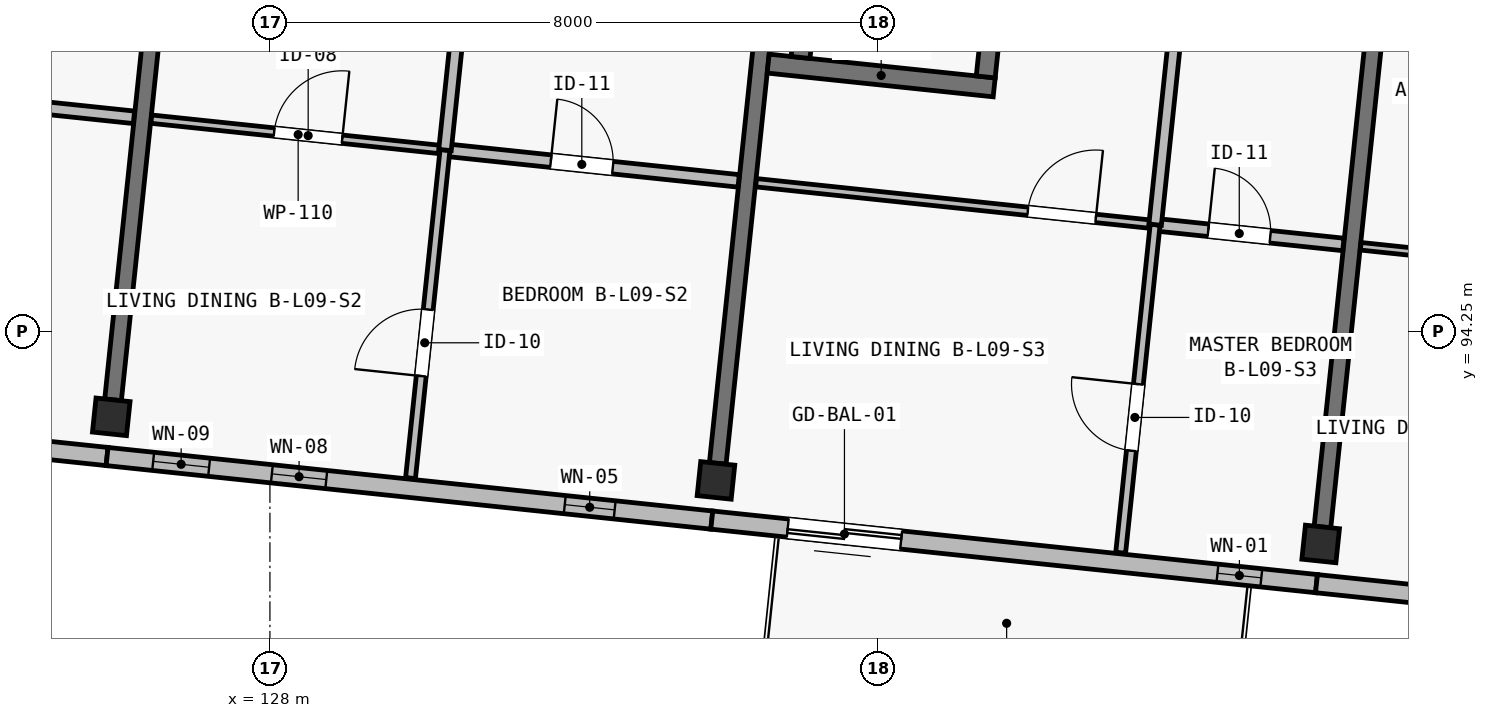
"""IFC4 building model, lengths in metres.
Left out: names, types, materials, properties, quantities, classifications, styles, units other than length and angle.
Written with IfcOpenShell. Run it as: python <this file> out.ifc"""

import sys

from ifc_helpers import new_model, si_unit, direction, frame, frame_2d, origin, origin_2d, place, context, subcontext, project, spatial, rectangle, extrude, element, fill, save


model = new_model("IFC4")
c1 = context("Model", 3, precision=1e-05, world=origin(), true_north=direction((0.0, 1.0)))
c2 = subcontext(c1, "Body", "Model", "MODEL_VIEW")
j1 = project(units=[si_unit("LENGTHUNIT", "METRE"), si_unit("PLANEANGLEUNIT", "RADIAN")], contexts=[c1])
p1 = place(None, origin())
s1 = spatial("IfcSite", under=j1, at=p1, CompositionType="ELEMENT")
p2 = place(p1, origin())
s2 = spatial("IfcBuilding", under=s1, at=p2, CompositionType="ELEMENT")
p3 = place(p2, frame((0.0, 0.0, 31.15)))
s3 = spatial("IfcBuildingStorey", under=s2, at=p3, CompositionType="ELEMENT", Elevation=31.15)
for number, where, z_axis, x_axis in (
    (1, (125.912, 93.127, 0.0), (0.0, 0.0, 1.0), (0.995, -0.105, 0.0)),
    (2, (133.868, 92.291, 0.0), (0.0, 0.0, 1.0), (0.995, -0.105, 0.0)),
    (3, (141.825, 91.455, 0.0), (0.0, 0.0, 1.0), (0.995, -0.105, 0.0)),
):
    element("IfcColumn", number, at=place(p3, frame(where, z_axis=z_axis, x_axis=x_axis)), inside=s3, PredefinedType="COLUMN", context=c2, shape_type="SweptSolid", body=[
        extrude(rectangle(XDim=0.45, YDim=0.45, at=origin_2d()), origin(), (0.0, 0.0, 1.0), 3.25),
    ])
p4 = place(p3, frame((125.936, 93.351, 0.0), z_axis=(0.0, 0.0, 1.0), x_axis=(0.104553253602, 0.994519289487, 0.0)))
e4 = element("IfcWall", 4, at=p4, inside=s3, PredefinedType="SHEAR", context=c2, shape_type="SweptSolid", body=[
    extrude(rectangle(XDim=7.15, YDim=0.22, at=frame_2d((3.575, 0.0))), origin(), (0.0, 0.0, 1.0), 2.5),
])
p5 = place(p3, frame((133.892, 92.515, 0.0), z_axis=(0.0, 0.0, 1.0), x_axis=(0.104519481265, 0.994522839374, 0.0)))
e5 = element("IfcWall", 5, at=p5, inside=s3, PredefinedType="SHEAR", context=c2, shape_type="SweptSolid", body=[
    extrude(rectangle(XDim=7.15, YDim=0.22, at=frame_2d((3.575, 0.0))), origin(), (0.0, 0.0, 1.0), 2.5),
])
p6 = place(p3, frame((141.848, 91.679, 0.0), z_axis=(0.0, 0.0, 1.0), x_axis=(0.104553253602, 0.994519289487, 0.0)))
e6 = element("IfcWall", 6, at=p6, inside=s3, PredefinedType="SHEAR", context=c2, shape_type="SweptSolid", body=[
    extrude(rectangle(XDim=7.15, YDim=0.22, at=frame_2d((3.575, 0.0))), origin(), (0.0, 0.0, 1.0), 2.5),
])
p7 = place(p3, frame((134.555, 97.775, 0.0), z_axis=(0.0, 0.0, 1.0), x_axis=(0.994514844427, -0.104595526741, 0.0)))
e7 = element("IfcWall", 7, at=p7, inside=s3, PredefinedType="SHEAR", context=c2, shape_type="SweptSolid", body=[
    extrude(rectangle(XDim=2.99, YDim=0.25, at=frame_2d((1.495, 0.0))), origin(), (0.0, 0.0, 1.0), 3.25),
])
for number, where, z_axis, x_axis in (
    (8, (134.981, 97.855, 0.0), (0.0, 0.0, 1.0), (0.105, 0.995, 0.0)),
    (9, (137.418, 97.599, 0.0), (0.0, 0.0, 1.0), (0.105, 0.995, 0.0)),
):
    element("IfcWall", number, at=place(p3, frame(where, z_axis=z_axis, x_axis=x_axis)), inside=s3, PredefinedType="SHEAR", context=c2, shape_type="SweptSolid", body=[
        extrude(rectangle(XDim=1.7, YDim=0.25, at=frame_2d((0.85, 0.0))), origin(), (0.0, 0.0, 1.0), 3.25),
    ])
p8 = place(p3, frame((125.857, 92.605, 0.0), z_axis=(0.0, 0.0, 1.0), x_axis=(-0.994522329422, 0.104524333444, 0.0)))
e10 = element("IfcWall", 10, at=p8, inside=s3, PredefinedType="SOLIDWALL", context=c2, shape_type="SweptSolid", body=[
    extrude(rectangle(XDim=8.0, YDim=0.24, at=frame_2d((4.0, 0.0))), origin(), (0.0, 0.0, 1.0), 3.0),
])
p9 = place(p8, frame((5.345, 0.0, 0.0)))
e11 = element("IfcOpeningElement", 11, at=p9, cuts=e10, PredefinedType="OPENING", context=c2, shape_type="SweptSolid", body=[
    extrude(rectangle(XDim=1.8, YDim=2.12, at=frame_2d((0.9, 1.06))), frame((0.0, 0.135, 0.0), z_axis=(0.0, -1.0, 0.0), x_axis=(1.0, 0.0, 0.0)), (0.0, 0.0, 1.0), 0.27),
])
p10 = place(p8, frame((1.03, 0.0, 0.46)))
e12 = element("IfcOpeningElement", 12, at=p10, cuts=e10, PredefinedType="OPENING", context=c2, shape_type="SweptSolid", body=[
    extrude(rectangle(XDim=0.76, YDim=2.34, at=frame_2d((0.38, 1.17))), frame((0.0, 0.135, 0.0), z_axis=(0.0, -1.0, 0.0), x_axis=(1.0, 0.0, 0.0)), (0.0, 0.0, 1.0), 0.27),
])
p11 = place(p3, frame((133.814, 91.769, 0.0), z_axis=(0.0, 0.0, 1.0), x_axis=(-0.994522662826, 0.104521161134, 0.0)))
e13 = element("IfcWall", 13, at=p11, inside=s3, PredefinedType="SOLIDWALL", context=c2, shape_type="SweptSolid", body=[
    extrude(rectangle(XDim=8.0, YDim=0.24, at=frame_2d((4.0, 0.0))), origin(), (0.0, 0.0, 1.0), 3.0),
])
p12 = place(p11, frame((1.285, 0.0, 0.52)))
e14 = element("IfcOpeningElement", 14, at=p12, cuts=e13, PredefinedType="OPENING", context=c2, shape_type="SweptSolid", body=[
    extrude(rectangle(XDim=0.66, YDim=2.32, at=frame_2d((0.33, 1.16))), frame((0.0, 0.135, 0.0), z_axis=(0.0, -1.0, 0.0), x_axis=(1.0, 0.0, 0.0)), (0.0, 0.0, 1.0), 0.27),
])
p13 = place(p11, frame((5.1, 0.0, 0.52)))
e15 = element("IfcOpeningElement", 15, at=p13, cuts=e13, PredefinedType="OPENING", context=c2, shape_type="SweptSolid", body=[
    extrude(rectangle(XDim=0.72, YDim=2.16, at=frame_2d((0.36, 1.08))), frame((0.0, 0.135, 0.0), z_axis=(0.0, -1.0, 0.0), x_axis=(1.0, 0.0, 0.0)), (0.0, 0.0, 1.0), 0.27),
])
p14 = place(p11, frame((6.65, 0.0, 0.42)))
e16 = element("IfcOpeningElement", 16, at=p14, cuts=e13, PredefinedType="OPENING", context=c2, shape_type="SweptSolid", body=[
    extrude(rectangle(XDim=0.74, YDim=2.26, at=frame_2d((0.37, 1.13))), frame((0.0, 0.135, 0.0), z_axis=(0.0, -1.0, 0.0), x_axis=(1.0, 0.0, 0.0)), (0.0, 0.0, 1.0), 0.27),
])
p15 = place(p3, frame((141.77, 90.933, 0.0), z_axis=(0.0, 0.0, 1.0), x_axis=(-0.994519156568, 0.104554517933, 0.0)))
e17 = element("IfcWall", 17, at=p15, inside=s3, PredefinedType="SOLIDWALL", context=c2, shape_type="SweptSolid", body=[
    extrude(rectangle(XDim=8.0, YDim=0.24, at=frame_2d((4.0, 0.0))), origin(), (0.0, 0.0, 1.0), 3.0),
])
p16 = place(p15, frame((5.495, 0.0, 0.0)))
e18 = element("IfcOpeningElement", 18, at=p16, cuts=e17, PredefinedType="OPENING", context=c2, shape_type="SweptSolid", body=[
    extrude(rectangle(XDim=1.5, YDim=2.12, at=frame_2d((0.75, 1.06))), frame((0.0, 0.135, 0.0), z_axis=(0.0, -1.0, 0.0), x_axis=(1.0, 0.0, 0.0)), (0.0, 0.0, 1.0), 0.27),
])
p17 = place(p15, frame((0.73, 0.0, 0.42)))
e19 = element("IfcOpeningElement", 19, at=p17, cuts=e17, PredefinedType="OPENING", context=c2, shape_type="SweptSolid", body=[
    extrude(rectangle(XDim=0.58, YDim=2.16, at=frame_2d((0.29, 1.08))), frame((0.0, 0.135, 0.0), z_axis=(0.0, -1.0, 0.0), x_axis=(1.0, 0.0, 0.0)), (0.0, 0.0, 1.0), 0.27),
])
p18 = place(p3, frame((149.726, 90.097, 0.0), z_axis=(0.0, 0.0, 1.0), x_axis=(-0.994522662826, 0.104521161134, 0.0)))
e20 = element("IfcWall", 20, at=p18, inside=s3, PredefinedType="SOLIDWALL", context=c2, shape_type="SweptSolid", body=[
    extrude(rectangle(XDim=8.0, YDim=0.24, at=frame_2d((4.0, 0.0))), origin(), (0.0, 0.0, 1.0), 3.0),
])
p19 = place(p18, frame((1.821, 0.0, 0.48)))
e21 = element("IfcOpeningElement", 21, at=p19, cuts=e20, PredefinedType="OPENING", context=c2, shape_type="SweptSolid", body=[
    extrude(rectangle(XDim=0.86, YDim=2.36, at=frame_2d((0.43, 1.18))), frame((0.0, 0.135, 0.0), z_axis=(0.0, -1.0, 0.0), x_axis=(1.0, 0.0, 0.0)), (0.0, 0.0, 1.0), 0.27),
])
p20 = place(p18, frame((5.362, 0.0, 0.48)))
e22 = element("IfcOpeningElement", 22, at=p20, cuts=e20, PredefinedType="OPENING", context=c2, shape_type="SweptSolid", body=[
    extrude(rectangle(XDim=0.62, YDim=2.28, at=frame_2d((0.31, 1.14))), frame((0.0, 0.135, 0.0), z_axis=(0.0, -1.0, 0.0), x_axis=(1.0, 0.0, 0.0)), (0.0, 0.0, 1.0), 0.27),
])
p21 = place(p3, frame((122.347, 97.474, 0.0), z_axis=(0.0, 0.0, 1.0), x_axis=(0.994517841934, -0.104567021925, 0.0)))
e23 = element("IfcWall", 23, at=p21, inside=s3, PredefinedType="PLUMBINGWALL", context=c2, shape_type="SweptSolid", body=[
    extrude(rectangle(XDim=3.885, YDim=0.165, at=frame_2d((1.942, 0.0))), origin(), (0.0, 0.0, 1.0), 2.97),
])
p22 = place(p21, frame((1.4, 0.0, 0.0)))
e24 = element("IfcOpeningElement", 24, at=p22, cuts=e23, PredefinedType="OPENING", context=c2, shape_type="SweptSolid", body=[
    extrude(rectangle(XDim=0.82, YDim=2.08, at=frame_2d((0.41, 1.04))), frame((0.0, 0.097, 0.0), z_axis=(0.0, -1.0, 0.0), x_axis=(1.0, 0.0, 0.0)), (0.0, 0.0, 1.0), 0.195),
])
p23 = place(p3, frame((126.44, 97.044, 0.0), z_axis=(0.0, 0.0, 1.0), x_axis=(0.994517154753, -0.104573557378, 0.0)))
e25 = element("IfcWall", 25, at=p23, inside=s3, PredefinedType="PARTITIONING", context=c2, shape_type="SweptSolid", body=[
    extrude(rectangle(XDim=3.885, YDim=0.11, at=frame_2d((1.942, 0.0))), origin(), (0.0, 0.0, 1.0), 2.97),
])
p24 = place(p23, frame((1.625, 0.0, 0.0)))
e26 = element("IfcOpeningElement", 26, at=p24, cuts=e25, PredefinedType="OPENING", context=c2, shape_type="SweptSolid", body=[
    extrude(rectangle(XDim=0.9, YDim=2.1, at=frame_2d((0.45, 1.05))), frame((0.0, 0.07, 0.0), z_axis=(0.0, -1.0, 0.0), x_axis=(1.0, 0.0, 0.0)), (0.0, 0.0, 1.0), 0.14),
])
p25 = place(p3, frame((130.303, 96.638, 0.0), z_axis=(0.0, 0.0, 1.0), x_axis=(0.994524375082, -0.104504867671, 0.0)))
e27 = element("IfcWall", 27, at=p25, inside=s3, PredefinedType="PLUMBINGWALL", context=c2, shape_type="SweptSolid", body=[
    extrude(rectangle(XDim=3.885, YDim=0.165, at=frame_2d((1.942, 0.0))), origin(), (0.0, 0.0, 1.0), 2.97),
])
p26 = place(p25, frame((1.4, 0.0, 0.0)))
e28 = element("IfcOpeningElement", 28, at=p26, cuts=e27, PredefinedType="OPENING", context=c2, shape_type="SweptSolid", body=[
    extrude(rectangle(XDim=0.82, YDim=2.08, at=frame_2d((0.41, 1.04))), frame((0.0, 0.097, 0.0), z_axis=(0.0, -1.0, 0.0), x_axis=(1.0, 0.0, 0.0)), (0.0, 0.0, 1.0), 0.195),
])
p27 = place(p3, frame((129.85, 92.322, 0.0), z_axis=(0.0, 0.0, 1.0), x_axis=(0.104520797474, 0.994522701046, 0.0)))
e29 = element("IfcWall", 29, at=p27, inside=s3, PredefinedType="PARTITIONING", context=c2, shape_type="SweptSolid", body=[
    extrude(rectangle(XDim=4.34, YDim=0.13, at=frame_2d((2.17, 0.0))), origin(), (0.0, 0.0, 1.0), 2.97),
])
p28 = place(p27, frame((1.35, 0.0, 0.0)))
e30 = element("IfcOpeningElement", 30, at=p28, cuts=e29, PredefinedType="OPENING", context=c2, shape_type="SweptSolid", body=[
    extrude(rectangle(XDim=0.88, YDim=2.1, at=frame_2d((0.44, 1.05))), frame((0.0, 0.08, 0.0), z_axis=(0.0, -1.0, 0.0), x_axis=(1.0, 0.0, 0.0)), (0.0, 0.0, 1.0), 0.16),
])
p29 = place(p3, frame((130.303, 96.638, 0.0), z_axis=(0.0, 0.0, 1.0), x_axis=(0.104550520052, 0.99451957686, 0.0)))
e31 = element("IfcWall", 31, at=p29, inside=s3, PredefinedType="PLUMBINGWALL", context=c2, shape_type="SweptSolid", body=[
    extrude(rectangle(XDim=4.07, YDim=0.165, at=frame_2d((2.035, 0.0))), origin(), (0.0, 0.0, 1.0), 2.97),
])
p30 = place(p3, frame((134.396, 96.208, 0.0), z_axis=(0.0, 0.0, 1.0), x_axis=(0.994520390767, -0.104542777606, 0.0)))
e32 = element("IfcWall", 32, at=p30, inside=s3, PredefinedType="PARTITIONING", context=c2, shape_type="SweptSolid", body=[
    extrude(rectangle(XDim=5.28, YDim=0.11, at=frame_2d((2.64, 0.0))), origin(), (0.0, 0.0, 1.0), 2.97),
])
p31 = place(p30, frame((3.595, 0.0, 0.0)))
e33 = element("IfcOpeningElement", 33, at=p31, cuts=e32, PredefinedType="OPENING", context=c2, shape_type="SweptSolid", body=[
    extrude(rectangle(XDim=0.9, YDim=2.1, at=frame_2d((0.45, 1.05))), frame((0.0, 0.07, 0.0), z_axis=(0.0, -1.0, 0.0), x_axis=(1.0, 0.0, 0.0)), (0.0, 0.0, 1.0), 0.14),
])
p32 = place(p3, frame((139.647, 95.656, 0.0), z_axis=(0.0, 0.0, 1.0), x_axis=(0.994522631864, -0.10452145574, 0.0)))
e34 = element("IfcWall", 34, at=p32, inside=s3, PredefinedType="PLUMBINGWALL", context=c2, shape_type="SweptSolid", body=[
    extrude(rectangle(XDim=2.49, YDim=0.165, at=frame_2d((1.245, 0.0))), origin(), (0.0, 0.0, 1.0), 2.97),
])
p33 = place(p32, frame((0.703, 0.0, 0.0)))
e35 = element("IfcOpeningElement", 35, at=p33, cuts=e34, PredefinedType="OPENING", context=c2, shape_type="SweptSolid", body=[
    extrude(rectangle(XDim=0.82, YDim=2.08, at=frame_2d((0.41, 1.04))), frame((0.0, 0.097, 0.0), z_axis=(0.0, -1.0, 0.0), x_axis=(1.0, 0.0, 0.0)), (0.0, 0.0, 1.0), 0.195),
])
p34 = place(p3, frame((139.193, 91.34, 0.0), z_axis=(0.0, 0.0, 1.0), x_axis=(0.104576436892, 0.994516851967, 0.0)))
e36 = element("IfcWall", 36, at=p34, inside=s3, PredefinedType="PARTITIONING", context=c2, shape_type="SweptSolid", body=[
    extrude(rectangle(XDim=4.34, YDim=0.13, at=frame_2d((2.17, 0.0))), origin(), (0.0, 0.0, 1.0), 2.97),
])
p35 = place(p34, frame((1.35, 0.0, 0.0)))
e37 = element("IfcOpeningElement", 37, at=p35, cuts=e36, PredefinedType="OPENING", context=c2, shape_type="SweptSolid", body=[
    extrude(rectangle(XDim=0.88, YDim=2.1, at=frame_2d((0.44, 1.05))), frame((0.0, 0.08, 0.0), z_axis=(0.0, -1.0, 0.0), x_axis=(1.0, 0.0, 0.0)), (0.0, 0.0, 1.0), 0.16),
])
p36 = place(p3, frame((139.647, 95.656, 0.0), z_axis=(0.0, 0.0, 1.0), x_axis=(0.104497425874, 0.99452515704, 0.0)))
e38 = element("IfcWall", 38, at=p36, inside=s3, PredefinedType="PLUMBINGWALL", context=c2, shape_type="SweptSolid", body=[
    extrude(rectangle(XDim=4.07, YDim=0.165, at=frame_2d((2.035, 0.0))), origin(), (0.0, 0.0, 1.0), 2.97),
])
p37 = place(p3, frame((142.352, 95.371, 0.0), z_axis=(0.0, 0.0, 1.0), x_axis=(0.994523688713, -0.104511399326, 0.0)))
e39 = element("IfcWall", 39, at=p37, inside=s3, PredefinedType="PARTITIONING", context=c2, shape_type="SweptSolid", body=[
    extrude(rectangle(XDim=3.885, YDim=0.1, at=frame_2d((1.942, 0.0))), origin(), (0.0, 0.0, 1.0), 2.97),
])
p38 = place(p37, frame((1.625, 0.0, 0.0)))
e40 = element("IfcOpeningElement", 40, at=p38, cuts=e39, PredefinedType="OPENING", context=c2, shape_type="SweptSolid", body=[
    extrude(rectangle(XDim=0.88, YDim=2.1, at=frame_2d((0.44, 1.05))), frame((0.0, 0.065, 0.0), z_axis=(0.0, -1.0, 0.0), x_axis=(1.0, 0.0, 0.0)), (0.0, 0.0, 1.0), 0.13),
])
p39 = place(p12, origin())
e41 = element("IfcWindow", 41, at=p39, inside=s3, PartitioningType="SINGLE_PANEL", PredefinedType="WINDOW", context=c2, shape_type="SweptSolid", body=[
    extrude(rectangle(XDim=0.66, YDim=2.32, at=frame_2d((0.33, 1.16))), frame((0.0, 0.03, 0.0), z_axis=(0.0, -1.0, 0.0), x_axis=(1.0, 0.0, 0.0)), (0.0, 0.0, 1.0), 0.06),
])
fill(e14, e41)
p40 = place(p13, origin())
e42 = element("IfcWindow", 42, at=p40, inside=s3, PartitioningType="SINGLE_PANEL", PredefinedType="WINDOW", context=c2, shape_type="SweptSolid", body=[
    extrude(rectangle(XDim=0.72, YDim=2.16, at=frame_2d((0.36, 1.08))), frame((0.0, 0.03, 0.0), z_axis=(0.0, -1.0, 0.0), x_axis=(1.0, 0.0, 0.0)), (0.0, 0.0, 1.0), 0.06),
])
fill(e15, e42)
p41 = place(p14, origin())
e43 = element("IfcWindow", 43, at=p41, inside=s3, PartitioningType="SINGLE_PANEL", PredefinedType="WINDOW", context=c2, shape_type="SweptSolid", body=[
    extrude(rectangle(XDim=0.74, YDim=2.26, at=frame_2d((0.37, 1.13))), frame((0.0, 0.03, 0.0), z_axis=(0.0, -1.0, 0.0), x_axis=(1.0, 0.0, 0.0)), (0.0, 0.0, 1.0), 0.06),
])
fill(e16, e43)
p42 = place(p16, origin())
e44 = element("IfcDoor", 44, at=p42, inside=s3, OperationType="SLIDING_TO_RIGHT", PredefinedType="DOOR", context=c2, shape_type="SweptSolid", body=[
    extrude(rectangle(XDim=1.5, YDim=2.12, at=frame_2d((0.75, 1.06))), frame((0.0, 0.025, 0.0), z_axis=(0.0, -1.0, 0.0), x_axis=(1.0, 0.0, 0.0)), (0.0, 0.0, 1.0), 0.05),
])
fill(e18, e44)
p43 = place(p17, origin())
e45 = element("IfcWindow", 45, at=p43, inside=s3, PartitioningType="SINGLE_PANEL", PredefinedType="WINDOW", context=c2, shape_type="SweptSolid", body=[
    extrude(rectangle(XDim=0.58, YDim=2.16, at=frame_2d((0.29, 1.08))), frame((0.0, 0.03, 0.0), z_axis=(0.0, -1.0, 0.0), x_axis=(1.0, 0.0, 0.0)), (0.0, 0.0, 1.0), 0.06),
])
fill(e19, e45)
p44 = place(p24, origin())
e46 = element("IfcDoor", 46, at=p44, inside=s3, OperationType="SINGLE_SWING_RIGHT", PredefinedType="DOOR", context=c2, shape_type="SweptSolid", body=[
    extrude(rectangle(XDim=0.9, YDim=2.1, at=frame_2d((0.45, 1.05))), frame((0.0, 0.025, 0.0), z_axis=(0.0, -1.0, 0.0), x_axis=(1.0, 0.0, 0.0)), (0.0, 0.0, 1.0), 0.05),
])
fill(e26, e46)
p45 = place(p26, origin())
e47 = element("IfcDoor", 47, at=p45, inside=s3, OperationType="SINGLE_SWING_LEFT", PredefinedType="DOOR", context=c2, shape_type="SweptSolid", body=[
    extrude(rectangle(XDim=0.82, YDim=2.08, at=frame_2d((0.41, 1.04))), frame((0.0, 0.025, 0.0), z_axis=(0.0, -1.0, 0.0), x_axis=(1.0, 0.0, 0.0)), (0.0, 0.0, 1.0), 0.05),
])
fill(e28, e47)
p46 = place(p28, origin())
e48 = element("IfcDoor", 48, at=p46, inside=s3, OperationType="SINGLE_SWING_LEFT", PredefinedType="DOOR", context=c2, shape_type="SweptSolid", body=[
    extrude(rectangle(XDim=0.88, YDim=2.1, at=frame_2d((0.44, 1.05))), frame((0.0, 0.025, 0.0), z_axis=(0.0, -1.0, 0.0), x_axis=(1.0, 0.0, 0.0)), (0.0, 0.0, 1.0), 0.05),
])
fill(e30, e48)
p47 = place(p31, origin())
e49 = element("IfcDoor", 49, at=p47, inside=s3, OperationType="SINGLE_SWING_RIGHT", PredefinedType="DOOR", context=c2, shape_type="SweptSolid", body=[
    extrude(rectangle(XDim=0.9, YDim=2.1, at=frame_2d((0.45, 1.05))), frame((0.0, 0.025, 0.0), z_axis=(0.0, -1.0, 0.0), x_axis=(1.0, 0.0, 0.0)), (0.0, 0.0, 1.0), 0.05),
])
fill(e33, e49)
p48 = place(p33, origin())
e50 = element("IfcDoor", 50, at=p48, inside=s3, OperationType="SINGLE_SWING_LEFT", PredefinedType="DOOR", context=c2, shape_type="SweptSolid", body=[
    extrude(rectangle(XDim=0.82, YDim=2.08, at=frame_2d((0.41, 1.04))), frame((0.0, 0.025, 0.0), z_axis=(0.0, -1.0, 0.0), x_axis=(1.0, 0.0, 0.0)), (0.0, 0.0, 1.0), 0.05),
])
fill(e35, e50)
p49 = place(p35, origin())
e51 = element("IfcDoor", 51, at=p49, inside=s3, OperationType="SINGLE_SWING_RIGHT", PredefinedType="DOOR", context=c2, shape_type="SweptSolid", body=[
    extrude(rectangle(XDim=0.88, YDim=2.1, at=frame_2d((0.44, 1.05))), frame((0.0, 0.025, 0.0), z_axis=(0.0, -1.0, 0.0), x_axis=(1.0, 0.0, 0.0)), (0.0, 0.0, 1.0), 0.05),
])
fill(e37, e51)
save(model, sys.argv[1])
